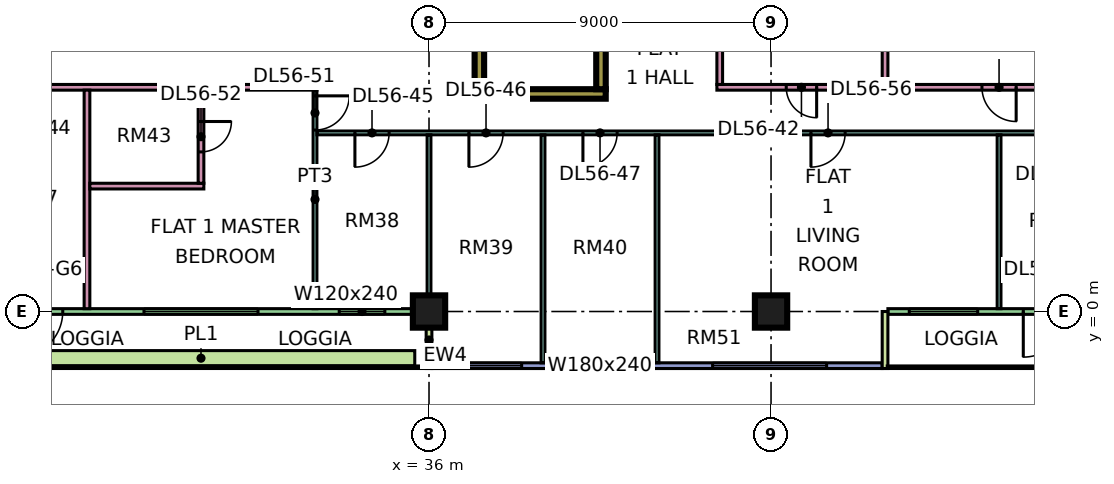
"""IFC4 building model, lengths in metres.
Left out: names, types, materials, properties, quantities, classifications, styles, units other than length and angle.
Written with IfcOpenShell. Run it as: python <this file> out.ifc"""

import sys

from ifc_helpers import new_model, si_unit, direction, frame, frame_2d, origin, origin_2d, place, context, subcontext, project, spatial, rectangle, extrude, element, fill, save


model = new_model("IFC4")
c1 = context("Model", 3, precision=1e-05, world=origin(), true_north=direction((0.0, 1.0)))
c2 = subcontext(c1, "Body", "Model", "MODEL_VIEW")
j1 = project(units=[si_unit("LENGTHUNIT", "METRE"), si_unit("PLANEANGLEUNIT", "RADIAN")], contexts=[c1])
p1 = place(None, origin())
s1 = spatial("IfcSite", under=j1, at=p1, CompositionType="ELEMENT")
p2 = place(p1, origin())
s2 = spatial("IfcBuilding", under=s1, at=p2, CompositionType="ELEMENT")
p3 = place(p2, frame((0.0, 0.0, 237.9)))
s3 = spatial("IfcBuildingStorey", under=s2, at=p3, CompositionType="ELEMENT", Elevation=237.9)
for number, where, z_axis, x_axis in (
    (1, (36.0, 0.0, 0.0), (0.0, 0.0, 1.0), (1.0, 0.0, 0.0)),
    (2, (45.0, 0.0, 0.0), (0.0, 0.0, 1.0), (1.0, 0.0, 0.0)),
):
    element("IfcColumn", number, at=place(p3, frame(where, z_axis=z_axis, x_axis=x_axis)), inside=s3, PredefinedType="COLUMN", context=c2, shape_type="SweptSolid", body=[
        extrude(rectangle(XDim=0.85, YDim=0.85, at=origin_2d()), origin(), (0.0, 0.0, 1.0), 3.75),
    ])
p4 = place(p3, frame((37.2, 5.725, 0.0), z_axis=(0.0, 0.0, 1.0), x_axis=(1.0, 0.0, 0.0)))
e3 = element("IfcWall", 3, at=p4, inside=s3, PredefinedType="SHEAR", context=c2, shape_type="SweptSolid", body=[
    extrude(rectangle(XDim=3.45, YDim=0.25, at=frame_2d((1.725, 0.0))), origin(), (0.0, 0.0, 1.0), 3.75),
])
for number, where, z_axis, x_axis in (
    (4, (37.325, 5.85, 0.0), (0.0, 0.0, 1.0), (0.0, 1.0, 0.0)),
    (5, (40.525, 5.85, 0.0), (0.0, 0.0, 1.0), (0.0, 1.0, 0.0)),
):
    element("IfcWall", number, at=place(p3, frame(where, z_axis=z_axis, x_axis=x_axis)), inside=s3, PredefinedType="SHEAR", context=c2, shape_type="SweptSolid", body=[
        extrude(rectangle(XDim=6.5, YDim=0.25, at=frame_2d((3.25, 0.0))), origin(), (0.0, 0.0, 1.0), 3.75),
    ])
p5 = place(p3, frame((24.075, 0.0, 0.0), z_axis=(0.0, 0.0, 1.0), x_axis=(1.0, 0.0, 0.0)))
e6 = element("IfcWall", 6, at=p5, inside=s3, PredefinedType="SOLIDWALL", context=c2, shape_type="SweptSolid", body=[
    extrude(rectangle(XDim=11.85, YDim=0.15, at=frame_2d((5.925, 0.0))), origin(), (0.0, 0.0, 1.0), 3.35),
])
p6 = place(p5, frame((1.087, 0.0, 0.0)))
e7 = element("IfcOpeningElement", 7, at=p6, cuts=e6, PredefinedType="OPENING", context=c2, shape_type="SweptSolid", body=[
    extrude(rectangle(XDim=1.2, YDim=2.4, at=frame_2d((0.6, 1.2))), frame((0.0, 0.085, 0.0), z_axis=(0.0, -1.0, 0.0), x_axis=(1.0, 0.0, 0.0)), (0.0, 0.0, 1.0), 0.17),
])
p7 = place(p5, frame((4.425, 0.0, 0.45)))
e8 = element("IfcOpeningElement", 8, at=p7, cuts=e6, PredefinedType="OPENING", context=c2, shape_type="SweptSolid", body=[
    extrude(rectangle(XDim=3.0, YDim=2.4, at=frame_2d((1.5, 1.2))), frame((0.0, 0.085, 0.0), z_axis=(0.0, -1.0, 0.0), x_axis=(1.0, 0.0, 0.0)), (0.0, 0.0, 1.0), 0.17),
])
p8 = place(p5, frame((9.562, 0.0, 0.45)))
e9 = element("IfcOpeningElement", 9, at=p8, cuts=e6, PredefinedType="OPENING", context=c2, shape_type="SweptSolid", body=[
    extrude(rectangle(XDim=1.2, YDim=2.4, at=frame_2d((0.6, 1.2))), frame((0.0, 0.085, 0.0), z_axis=(0.0, -1.0, 0.0), x_axis=(1.0, 0.0, 0.0)), (0.0, 0.0, 1.0), 0.17),
])
p9 = place(p3, frame((36.0, -1.5, 0.0), z_axis=(0.0, 0.0, 1.0), x_axis=(0.0, 1.0, 0.0)))
e10 = element("IfcWall", 10, at=p9, inside=s3, PredefinedType="SOLIDWALL", context=c2, shape_type="SweptSolid", body=[
    extrude(rectangle(XDim=1.5, YDim=0.15, at=frame_2d((0.75, 0.0))), origin(), (0.0, 0.0, 1.0), 3.35),
])
p10 = place(p3, frame((36.075, -1.425, 0.0), z_axis=(0.0, 0.0, 1.0), x_axis=(1.0, 0.0, 0.0)))
e11 = element("IfcWall", 11, at=p10, inside=s3, PredefinedType="SOLIDWALL", context=c2, shape_type="SweptSolid", body=[
    extrude(rectangle(XDim=11.85, YDim=0.15, at=frame_2d((5.925, 0.0))), origin(), (0.0, 0.0, 1.0), 3.35),
])
p11 = place(p10, frame((0.562, 0.0, 0.45)))
e12 = element("IfcOpeningElement", 12, at=p11, cuts=e11, PredefinedType="OPENING", context=c2, shape_type="SweptSolid", body=[
    extrude(rectangle(XDim=1.8, YDim=2.4, at=frame_2d((0.9, 1.2))), frame((0.0, 0.085, 0.0), z_axis=(0.0, -1.0, 0.0), x_axis=(1.0, 0.0, 0.0)), (0.0, 0.0, 1.0), 0.17),
])
p12 = place(p10, frame((3.525, 0.0, 0.45)))
e13 = element("IfcOpeningElement", 13, at=p12, cuts=e11, PredefinedType="OPENING", context=c2, shape_type="SweptSolid", body=[
    extrude(rectangle(XDim=1.8, YDim=2.4, at=frame_2d((0.9, 1.2))), frame((0.0, 0.085, 0.0), z_axis=(0.0, -1.0, 0.0), x_axis=(1.0, 0.0, 0.0)), (0.0, 0.0, 1.0), 0.17),
])
p13 = place(p10, frame((7.387, 0.0, 0.45)))
e14 = element("IfcOpeningElement", 14, at=p13, cuts=e11, PredefinedType="OPENING", context=c2, shape_type="SweptSolid", body=[
    extrude(rectangle(XDim=3.0, YDim=2.4, at=frame_2d((1.5, 1.2))), frame((0.0, 0.085, 0.0), z_axis=(0.0, -1.0, 0.0), x_axis=(1.0, 0.0, 0.0)), (0.0, 0.0, 1.0), 0.17),
])
p14 = place(p3, frame((48.075, 0.0, 0.0), z_axis=(0.0, 0.0, 1.0), x_axis=(1.0, 0.0, 0.0)))
e15 = element("IfcWall", 15, at=p14, inside=s3, PredefinedType="SOLIDWALL", context=c2, shape_type="SweptSolid", body=[
    extrude(rectangle(XDim=13.35, YDim=0.15, at=frame_2d((6.675, 0.0))), origin(), (0.0, 0.0, 1.0), 3.35),
])
p15 = place(p14, frame((0.562, 0.0, 0.45)))
e16 = element("IfcOpeningElement", 16, at=p15, cuts=e15, PredefinedType="OPENING", context=c2, shape_type="SweptSolid", body=[
    extrude(rectangle(XDim=1.8, YDim=2.4, at=frame_2d((0.9, 1.2))), frame((0.0, 0.085, 0.0), z_axis=(0.0, -1.0, 0.0), x_axis=(1.0, 0.0, 0.0)), (0.0, 0.0, 1.0), 0.17),
])
p16 = place(p14, frame((3.562, 0.0, 0.0)))
e17 = element("IfcOpeningElement", 17, at=p16, cuts=e15, PredefinedType="OPENING", context=c2, shape_type="SweptSolid", body=[
    extrude(rectangle(XDim=1.2, YDim=2.4, at=frame_2d((0.6, 1.2))), frame((0.0, 0.085, 0.0), z_axis=(0.0, -1.0, 0.0), x_axis=(1.0, 0.0, 0.0)), (0.0, 0.0, 1.0), 0.17),
])
p17 = place(p14, frame((7.688, 0.0, 0.45)))
e18 = element("IfcOpeningElement", 18, at=p17, cuts=e15, PredefinedType="OPENING", context=c2, shape_type="SweptSolid", body=[
    extrude(rectangle(XDim=3.0, YDim=2.4, at=frame_2d((1.5, 1.2))), frame((0.0, 0.085, 0.0), z_axis=(0.0, -1.0, 0.0), x_axis=(1.0, 0.0, 0.0)), (0.0, 0.0, 1.0), 0.17),
])
p18 = place(p3, frame((48.0, -1.5, 0.0), z_axis=(0.0, 0.0, 1.0), x_axis=(0.0, 1.0, 0.0)))
e19 = element("IfcWall", 19, at=p18, inside=s3, PredefinedType="SOLIDWALL", context=c2, shape_type="SweptSolid", body=[
    extrude(rectangle(XDim=1.5, YDim=0.15, at=frame_2d((0.75, 0.0))), origin(), (0.0, 0.0, 1.0), 3.35),
])
p19 = place(p3, frame((24.375, -1.229, 0.0), z_axis=(0.0, 0.0, 1.0), x_axis=(1.0, 0.0, 0.0)))
e20 = element("IfcWall", 20, at=p19, inside=s3, PredefinedType="SOLIDWALL", context=c2, shape_type="SweptSolid", body=[
    extrude(rectangle(XDim=11.25, YDim=0.4, at=frame_2d((5.625, 0.0))), origin(), (0.0, 0.0, 1.0), 0.7),
])
p20 = place(p3, frame((11.95, 5.9, 0.0), z_axis=(0.0, 0.0, 1.0), x_axis=(1.0, 0.0, 0.0)))
e21 = element("IfcWall", 21, at=p20, inside=s3, PredefinedType="PARTITIONING", context=c2, shape_type="SweptSolid", body=[
    extrude(rectangle(XDim=21.1, YDim=0.15, at=frame_2d((10.55, 0.0))), origin(), (0.0, 0.0, 1.0), 3.35),
])
p21 = place(p20, frame((1.1, 0.0, 0.0)))
e22 = element("IfcOpeningElement", 22, at=p21, cuts=e21, PredefinedType="OPENING", context=c2, shape_type="SweptSolid", body=[
    extrude(rectangle(XDim=0.9, YDim=2.1, at=frame_2d((0.45, 1.05))), frame((0.0, 0.085, 0.0), z_axis=(0.0, -1.0, 0.0), x_axis=(1.0, 0.0, 0.0)), (0.0, 0.0, 1.0), 0.17),
])
p22 = place(p20, frame((13.1, 0.0, 0.0)))
e23 = element("IfcOpeningElement", 23, at=p22, cuts=e21, PredefinedType="OPENING", context=c2, shape_type="SweptSolid", body=[
    extrude(rectangle(XDim=0.9, YDim=2.1, at=frame_2d((0.45, 1.05))), frame((0.0, 0.085, 0.0), z_axis=(0.0, -1.0, 0.0), x_axis=(1.0, 0.0, 0.0)), (0.0, 0.0, 1.0), 0.17),
])
p23 = place(p20, frame((7.1, 0.0, 0.0)))
e24 = element("IfcOpeningElement", 24, at=p23, cuts=e21, PredefinedType="OPENING", context=c2, shape_type="SweptSolid", body=[
    extrude(rectangle(XDim=0.9, YDim=2.1, at=frame_2d((0.45, 1.05))), frame((0.0, 0.085, 0.0), z_axis=(0.0, -1.0, 0.0), x_axis=(1.0, 0.0, 0.0)), (0.0, 0.0, 1.0), 0.17),
])
p24 = place(p3, frame((27.0, 0.074, 0.0), z_axis=(0.0, 0.0, 1.0), x_axis=(0.0, 1.0, 0.0)))
e25 = element("IfcWall", 25, at=p24, inside=s3, PredefinedType="PARTITIONING", context=c2, shape_type="SweptSolid", body=[
    extrude(rectangle(XDim=5.751, YDim=0.15, at=frame_2d((2.875, 0.0))), origin(), (0.0, 0.0, 1.0), 3.35),
])
p25 = place(p3, frame((27.075, 3.3, 0.0), z_axis=(0.0, 0.0, 1.0), x_axis=(1.0, 0.0, 0.0)))
e26 = element("IfcWall", 26, at=p25, inside=s3, PredefinedType="PARTITIONING", context=c2, shape_type="SweptSolid", body=[
    extrude(rectangle(XDim=3.0, YDim=0.15, at=frame_2d((1.5, 0.0))), origin(), (0.0, 0.0, 1.0), 3.35),
])
p26 = place(p3, frame((30.0, 3.375, 0.0), z_axis=(0.0, 0.0, 1.0), x_axis=(0.0, 1.0, 0.0)))
e27 = element("IfcWall", 27, at=p26, inside=s3, PredefinedType="PARTITIONING", context=c2, shape_type="SweptSolid", body=[
    extrude(rectangle(XDim=2.45, YDim=0.15, at=frame_2d((1.225, 0.0))), origin(), (0.0, 0.0, 1.0), 3.35),
])
p27 = place(p26, frame((0.825, 0.0, 0.0)))
e28 = element("IfcOpeningElement", 28, at=p27, cuts=e27, PredefinedType="OPENING", context=c2, shape_type="SweptSolid", body=[
    extrude(rectangle(XDim=0.8, YDim=2.1, at=frame_2d((0.4, 1.05))), frame((0.0, 0.085, 0.0), z_axis=(0.0, -1.0, 0.0), x_axis=(1.0, 0.0, 0.0)), (0.0, 0.0, 1.0), 0.17),
])
p28 = place(p3, frame((33.0, 0.074, 0.0), z_axis=(0.0, 0.0, 1.0), x_axis=(0.0, 1.0, 0.0)))
e29 = element("IfcWall", 29, at=p28, inside=s3, PredefinedType="PARTITIONING", context=c2, shape_type="SweptSolid", body=[
    extrude(rectangle(XDim=5.751, YDim=0.1, at=frame_2d((2.875, 0.0))), origin(), (0.0, 0.0, 1.0), 3.35),
])
p29 = place(p28, frame((4.701, 0.0, 0.0)))
e30 = element("IfcOpeningElement", 30, at=p29, cuts=e29, PredefinedType="OPENING", context=c2, shape_type="SweptSolid", body=[
    extrude(rectangle(XDim=0.9, YDim=2.1, at=frame_2d((0.45, 1.05))), frame((0.0, 0.06, 0.0), z_axis=(0.0, -1.0, 0.0), x_axis=(1.0, 0.0, 0.0)), (0.0, 0.0, 1.0), 0.12),
])
p30 = place(p3, frame((33.05, 4.7, 0.0), z_axis=(0.0, 0.0, 1.0), x_axis=(1.0, 0.0, 0.0)))
e31 = element("IfcWall", 31, at=p30, inside=s3, PredefinedType="PARTITIONING", context=c2, shape_type="SweptSolid", body=[
    extrude(rectangle(XDim=20.85, YDim=0.1, at=frame_2d((10.425, 0.0))), origin(), (0.0, 0.0, 1.0), 3.35),
])
p31 = place(p30, frame((1.0, 0.0, 0.0)))
e32 = element("IfcOpeningElement", 32, at=p31, cuts=e31, PredefinedType="OPENING", context=c2, shape_type="SweptSolid", body=[
    extrude(rectangle(XDim=0.9, YDim=2.1, at=frame_2d((0.45, 1.05))), frame((0.0, 0.06, 0.0), z_axis=(0.0, -1.0, 0.0), x_axis=(1.0, 0.0, 0.0)), (0.0, 0.0, 1.0), 0.12),
])
p32 = place(p30, frame((4.0, 0.0, 0.0)))
e33 = element("IfcOpeningElement", 33, at=p32, cuts=e31, PredefinedType="OPENING", context=c2, shape_type="SweptSolid", body=[
    extrude(rectangle(XDim=0.9, YDim=2.1, at=frame_2d((0.45, 1.05))), frame((0.0, 0.06, 0.0), z_axis=(0.0, -1.0, 0.0), x_axis=(1.0, 0.0, 0.0)), (0.0, 0.0, 1.0), 0.12),
])
p33 = place(p30, frame((7.0, 0.0, 0.0)))
e34 = element("IfcOpeningElement", 34, at=p33, cuts=e31, PredefinedType="OPENING", context=c2, shape_type="SweptSolid", body=[
    extrude(rectangle(XDim=0.9, YDim=2.1, at=frame_2d((0.45, 1.05))), frame((0.0, 0.06, 0.0), z_axis=(0.0, -1.0, 0.0), x_axis=(1.0, 0.0, 0.0)), (0.0, 0.0, 1.0), 0.12),
])
p34 = place(p30, frame((19.0, 0.0, 0.0)))
e35 = element("IfcOpeningElement", 35, at=p34, cuts=e31, PredefinedType="OPENING", context=c2, shape_type="SweptSolid", body=[
    extrude(rectangle(XDim=0.9, YDim=2.1, at=frame_2d((0.45, 1.05))), frame((0.0, 0.06, 0.0), z_axis=(0.0, -1.0, 0.0), x_axis=(1.0, 0.0, 0.0)), (0.0, 0.0, 1.0), 0.12),
])
p35 = place(p30, frame((13.0, 0.0, 0.0)))
e36 = element("IfcOpeningElement", 36, at=p35, cuts=e31, PredefinedType="OPENING", context=c2, shape_type="SweptSolid", body=[
    extrude(rectangle(XDim=0.9, YDim=2.1, at=frame_2d((0.45, 1.05))), frame((0.0, 0.06, 0.0), z_axis=(0.0, -1.0, 0.0), x_axis=(1.0, 0.0, 0.0)), (0.0, 0.0, 1.0), 0.12),
])
p36 = place(p3, frame((36.0, 0.0, 0.0), z_axis=(0.0, 0.0, 1.0), x_axis=(0.0, 1.0, 0.0)))
e37 = element("IfcWall", 37, at=p36, inside=s3, PredefinedType="PARTITIONING", context=c2, shape_type="SweptSolid", body=[
    extrude(rectangle(XDim=4.65, YDim=0.1, at=frame_2d((2.325, 0.0))), origin(), (0.0, 0.0, 1.0), 3.35),
])
p37 = place(p3, frame((39.0, -1.351, 0.0), z_axis=(0.0, 0.0, 1.0), x_axis=(0.0, 1.0, 0.0)))
e38 = element("IfcWall", 38, at=p37, inside=s3, PredefinedType="PARTITIONING", context=c2, shape_type="SweptSolid", body=[
    extrude(rectangle(XDim=6.001, YDim=0.1, at=frame_2d((3.0, 0.0))), origin(), (0.0, 0.0, 1.0), 3.35),
])
p38 = place(p3, frame((42.0, -1.35, 0.0), z_axis=(0.0, 0.0, 1.0), x_axis=(0.0, 1.0, 0.0)))
e39 = element("IfcWall", 39, at=p38, inside=s3, PredefinedType="PARTITIONING", context=c2, shape_type="SweptSolid", body=[
    extrude(rectangle(XDim=6.0, YDim=0.1, at=frame_2d((3.0, 0.0))), origin(), (0.0, 0.0, 1.0), 3.35),
])
p39 = place(p3, frame((43.575, 5.9, 0.0), z_axis=(0.0, 0.0, 1.0), x_axis=(1.0, 0.0, 0.0)))
e40 = element("IfcWall", 40, at=p39, inside=s3, PredefinedType="PARTITIONING", context=c2, shape_type="SweptSolid", body=[
    extrude(rectangle(XDim=10.325, YDim=0.15, at=frame_2d((5.163, 0.0))), origin(), (0.0, 0.0, 1.0), 3.35),
])
p40 = place(p39, frame((1.825, 0.0, 0.0)))
e41 = element("IfcOpeningElement", 41, at=p40, cuts=e40, PredefinedType="OPENING", context=c2, shape_type="SweptSolid", body=[
    extrude(rectangle(XDim=0.8, YDim=2.1, at=frame_2d((0.4, 1.05))), frame((0.0, 0.085, 0.0), z_axis=(0.0, -1.0, 0.0), x_axis=(1.0, 0.0, 0.0)), (0.0, 0.0, 1.0), 0.17),
])
p41 = place(p39, frame((6.975, 0.0, 0.0)))
e42 = element("IfcOpeningElement", 42, at=p41, cuts=e40, PredefinedType="OPENING", context=c2, shape_type="SweptSolid", body=[
    extrude(rectangle(XDim=0.9, YDim=2.1, at=frame_2d((0.45, 1.05))), frame((0.0, 0.085, 0.0), z_axis=(0.0, -1.0, 0.0), x_axis=(1.0, 0.0, 0.0)), (0.0, 0.0, 1.0), 0.17),
])
p42 = place(p3, frame((43.65, 5.975, 0.0), z_axis=(0.0, 0.0, 1.0), x_axis=(0.0, 1.0, 0.0)))
e43 = element("IfcWall", 43, at=p42, inside=s3, PredefinedType="PARTITIONING", context=c2, shape_type="SweptSolid", body=[
    extrude(rectangle(XDim=6.35, YDim=0.15, at=frame_2d((3.175, 0.0))), origin(), (0.0, 0.0, 1.0), 3.35),
])
p43 = place(p42, frame((4.275, 0.0, 0.0)))
e44 = element("IfcOpeningElement", 44, at=p43, cuts=e43, PredefinedType="OPENING", context=c2, shape_type="SweptSolid", body=[
    extrude(rectangle(XDim=0.9, YDim=2.1, at=frame_2d((0.45, 1.05))), frame((0.0, 0.085, 0.0), z_axis=(0.0, -1.0, 0.0), x_axis=(1.0, 0.0, 0.0)), (0.0, 0.0, 1.0), 0.17),
])
p44 = place(p3, frame((48.0, 5.975, 0.0), z_axis=(0.0, 0.0, 1.0), x_axis=(0.0, 1.0, 0.0)))
e45 = element("IfcWall", 45, at=p44, inside=s3, PredefinedType="PARTITIONING", context=c2, shape_type="SweptSolid", body=[
    extrude(rectangle(XDim=6.35, YDim=0.15, at=frame_2d((3.175, 0.0))), origin(), (0.0, 0.0, 1.0), 3.35),
])
p45 = place(p3, frame((51.0, 0.074, 0.0), z_axis=(0.0, 0.0, 1.0), x_axis=(0.0, 1.0, 0.0)))
e46 = element("IfcWall", 46, at=p45, inside=s3, PredefinedType="PARTITIONING", context=c2, shape_type="SweptSolid", body=[
    extrude(rectangle(XDim=4.576, YDim=0.1, at=frame_2d((2.288, 0.0))), origin(), (0.0, 0.0, 1.0), 3.35),
])
p46 = place(p6, frame((1.2, 0.0, 0.0), z_axis=(0.0, 0.0, 1.0), x_axis=(-1.0, 0.0, 0.0)))
e47 = element("IfcDoor", 47, at=p46, inside=s3, OperationType="DOUBLE_DOOR_SINGLE_SWING", PredefinedType="DOOR", context=c2, shape_type="SweptSolid", body=[
    extrude(rectangle(XDim=1.2, YDim=2.4, at=frame_2d((0.6, 1.2))), frame((0.0, 0.025, 0.0), z_axis=(0.0, -1.0, 0.0), x_axis=(1.0, 0.0, 0.0)), (0.0, 0.0, 1.0), 0.05),
])
fill(e7, e47)
p47 = place(p7, origin())
e48 = element("IfcWindow", 48, at=p47, inside=s3, PartitioningType="SINGLE_PANEL", PredefinedType="WINDOW", context=c2, shape_type="SweptSolid", body=[
    extrude(rectangle(XDim=3.0, YDim=2.4, at=frame_2d((1.5, 1.2))), frame((0.0, 0.03, 0.0), z_axis=(0.0, -1.0, 0.0), x_axis=(1.0, 0.0, 0.0)), (0.0, 0.0, 1.0), 0.06),
])
fill(e8, e48)
p48 = place(p8, origin())
e49 = element("IfcWindow", 49, at=p48, inside=s3, PartitioningType="SINGLE_PANEL", PredefinedType="WINDOW", context=c2, shape_type="SweptSolid", body=[
    extrude(rectangle(XDim=1.2, YDim=2.4, at=frame_2d((0.6, 1.2))), frame((0.0, 0.03, 0.0), z_axis=(0.0, -1.0, 0.0), x_axis=(1.0, 0.0, 0.0)), (0.0, 0.0, 1.0), 0.06),
])
fill(e9, e49)
p49 = place(p11, origin())
e50 = element("IfcWindow", 50, at=p49, inside=s3, PartitioningType="SINGLE_PANEL", PredefinedType="WINDOW", context=c2, shape_type="SweptSolid", body=[
    extrude(rectangle(XDim=1.8, YDim=2.4, at=frame_2d((0.9, 1.2))), frame((0.0, 0.03, 0.0), z_axis=(0.0, -1.0, 0.0), x_axis=(1.0, 0.0, 0.0)), (0.0, 0.0, 1.0), 0.06),
])
fill(e12, e50)
p50 = place(p12, origin())
e51 = element("IfcWindow", 51, at=p50, inside=s3, PartitioningType="SINGLE_PANEL", PredefinedType="WINDOW", context=c2, shape_type="SweptSolid", body=[
    extrude(rectangle(XDim=1.8, YDim=2.4, at=frame_2d((0.9, 1.2))), frame((0.0, 0.03, 0.0), z_axis=(0.0, -1.0, 0.0), x_axis=(1.0, 0.0, 0.0)), (0.0, 0.0, 1.0), 0.06),
])
fill(e13, e51)
p51 = place(p13, origin())
e52 = element("IfcWindow", 52, at=p51, inside=s3, PartitioningType="SINGLE_PANEL", PredefinedType="WINDOW", context=c2, shape_type="SweptSolid", body=[
    extrude(rectangle(XDim=3.0, YDim=2.4, at=frame_2d((1.5, 1.2))), frame((0.0, 0.03, 0.0), z_axis=(0.0, -1.0, 0.0), x_axis=(1.0, 0.0, 0.0)), (0.0, 0.0, 1.0), 0.06),
])
fill(e14, e52)
p52 = place(p15, origin())
e53 = element("IfcWindow", 53, at=p52, inside=s3, PartitioningType="SINGLE_PANEL", PredefinedType="WINDOW", context=c2, shape_type="SweptSolid", body=[
    extrude(rectangle(XDim=1.8, YDim=2.4, at=frame_2d((0.9, 1.2))), frame((0.0, 0.03, 0.0), z_axis=(0.0, -1.0, 0.0), x_axis=(1.0, 0.0, 0.0)), (0.0, 0.0, 1.0), 0.06),
])
fill(e16, e53)
p53 = place(p16, frame((1.2, 0.0, 0.0), z_axis=(0.0, 0.0, 1.0), x_axis=(-1.0, 0.0, 0.0)))
e54 = element("IfcDoor", 54, at=p53, inside=s3, OperationType="DOUBLE_DOOR_SINGLE_SWING", PredefinedType="DOOR", context=c2, shape_type="SweptSolid", body=[
    extrude(rectangle(XDim=1.2, YDim=2.4, at=frame_2d((0.6, 1.2))), frame((0.0, 0.025, 0.0), z_axis=(0.0, -1.0, 0.0), x_axis=(1.0, 0.0, 0.0)), (0.0, 0.0, 1.0), 0.05),
])
fill(e17, e54)
p54 = place(p40, origin())
e55 = element("IfcDoor", 55, at=p54, inside=s3, OperationType="SINGLE_SWING_RIGHT", PredefinedType="DOOR", context=c2, shape_type="SweptSolid", body=[
    extrude(rectangle(XDim=0.8, YDim=2.1, at=frame_2d((0.4, 1.05))), frame((0.0, 0.025, 0.0), z_axis=(0.0, -1.0, 0.0), x_axis=(1.0, 0.0, 0.0)), (0.0, 0.0, 1.0), 0.05),
])
fill(e41, e55)
p55 = place(p31, frame((0.9, 0.0, 0.0), z_axis=(0.0, 0.0, 1.0), x_axis=(-1.0, 0.0, 0.0)))
e56 = element("IfcDoor", 56, at=p55, inside=s3, OperationType="SINGLE_SWING_LEFT", PredefinedType="DOOR", context=c2, shape_type="SweptSolid", body=[
    extrude(rectangle(XDim=0.9, YDim=2.1, at=frame_2d((0.45, 1.05))), frame((0.0, 0.025, 0.0), z_axis=(0.0, -1.0, 0.0), x_axis=(1.0, 0.0, 0.0)), (0.0, 0.0, 1.0), 0.05),
])
fill(e32, e56)
p56 = place(p32, frame((0.9, 0.0, 0.0), z_axis=(0.0, 0.0, 1.0), x_axis=(-1.0, 0.0, 0.0)))
e57 = element("IfcDoor", 57, at=p56, inside=s3, OperationType="SINGLE_SWING_LEFT", PredefinedType="DOOR", context=c2, shape_type="SweptSolid", body=[
    extrude(rectangle(XDim=0.9, YDim=2.1, at=frame_2d((0.45, 1.05))), frame((0.0, 0.025, 0.0), z_axis=(0.0, -1.0, 0.0), x_axis=(1.0, 0.0, 0.0)), (0.0, 0.0, 1.0), 0.05),
])
fill(e33, e57)
p57 = place(p33, frame((0.9, 0.0, 0.0), z_axis=(0.0, 0.0, 1.0), x_axis=(-1.0, 0.0, 0.0)))
e58 = element("IfcDoor", 58, at=p57, inside=s3, OperationType="SINGLE_SWING_LEFT", PredefinedType="DOOR", context=c2, shape_type="SweptSolid", body=[
    extrude(rectangle(XDim=0.9, YDim=2.1, at=frame_2d((0.45, 1.05))), frame((0.0, 0.025, 0.0), z_axis=(0.0, -1.0, 0.0), x_axis=(1.0, 0.0, 0.0)), (0.0, 0.0, 1.0), 0.05),
])
fill(e34, e58)
p58 = place(p29, origin())
e59 = element("IfcDoor", 59, at=p58, inside=s3, OperationType="SINGLE_SWING_RIGHT", PredefinedType="DOOR", context=c2, shape_type="SweptSolid", body=[
    extrude(rectangle(XDim=0.9, YDim=2.1, at=frame_2d((0.45, 1.05))), frame((0.0, 0.025, 0.0), z_axis=(0.0, -1.0, 0.0), x_axis=(1.0, 0.0, 0.0)), (0.0, 0.0, 1.0), 0.05),
])
fill(e30, e59)
p59 = place(p27, origin())
e60 = element("IfcDoor", 60, at=p59, inside=s3, OperationType="SINGLE_SWING_RIGHT", PredefinedType="DOOR", context=c2, shape_type="SweptSolid", body=[
    extrude(rectangle(XDim=0.8, YDim=2.1, at=frame_2d((0.4, 1.05))), frame((0.0, 0.025, 0.0), z_axis=(0.0, -1.0, 0.0), x_axis=(1.0, 0.0, 0.0)), (0.0, 0.0, 1.0), 0.05),
])
fill(e28, e60)
p60 = place(p35, frame((0.9, 0.0, 0.0), z_axis=(0.0, 0.0, 1.0), x_axis=(-1.0, 0.0, 0.0)))
e61 = element("IfcDoor", 61, at=p60, inside=s3, OperationType="SINGLE_SWING_LEFT", PredefinedType="DOOR", context=c2, shape_type="SweptSolid", body=[
    extrude(rectangle(XDim=0.9, YDim=2.1, at=frame_2d((0.45, 1.05))), frame((0.0, 0.025, 0.0), z_axis=(0.0, -1.0, 0.0), x_axis=(1.0, 0.0, 0.0)), (0.0, 0.0, 1.0), 0.05),
])
fill(e36, e61)
p61 = place(p41, origin())
e62 = element("IfcDoor", 62, at=p61, inside=s3, OperationType="SINGLE_SWING_RIGHT", PredefinedType="DOOR", context=c2, shape_type="SweptSolid", body=[
    extrude(rectangle(XDim=0.9, YDim=2.1, at=frame_2d((0.45, 1.05))), frame((0.0, 0.025, 0.0), z_axis=(0.0, -1.0, 0.0), x_axis=(1.0, 0.0, 0.0)), (0.0, 0.0, 1.0), 0.05),
])
fill(e42, e62)
save(model, sys.argv[1])
